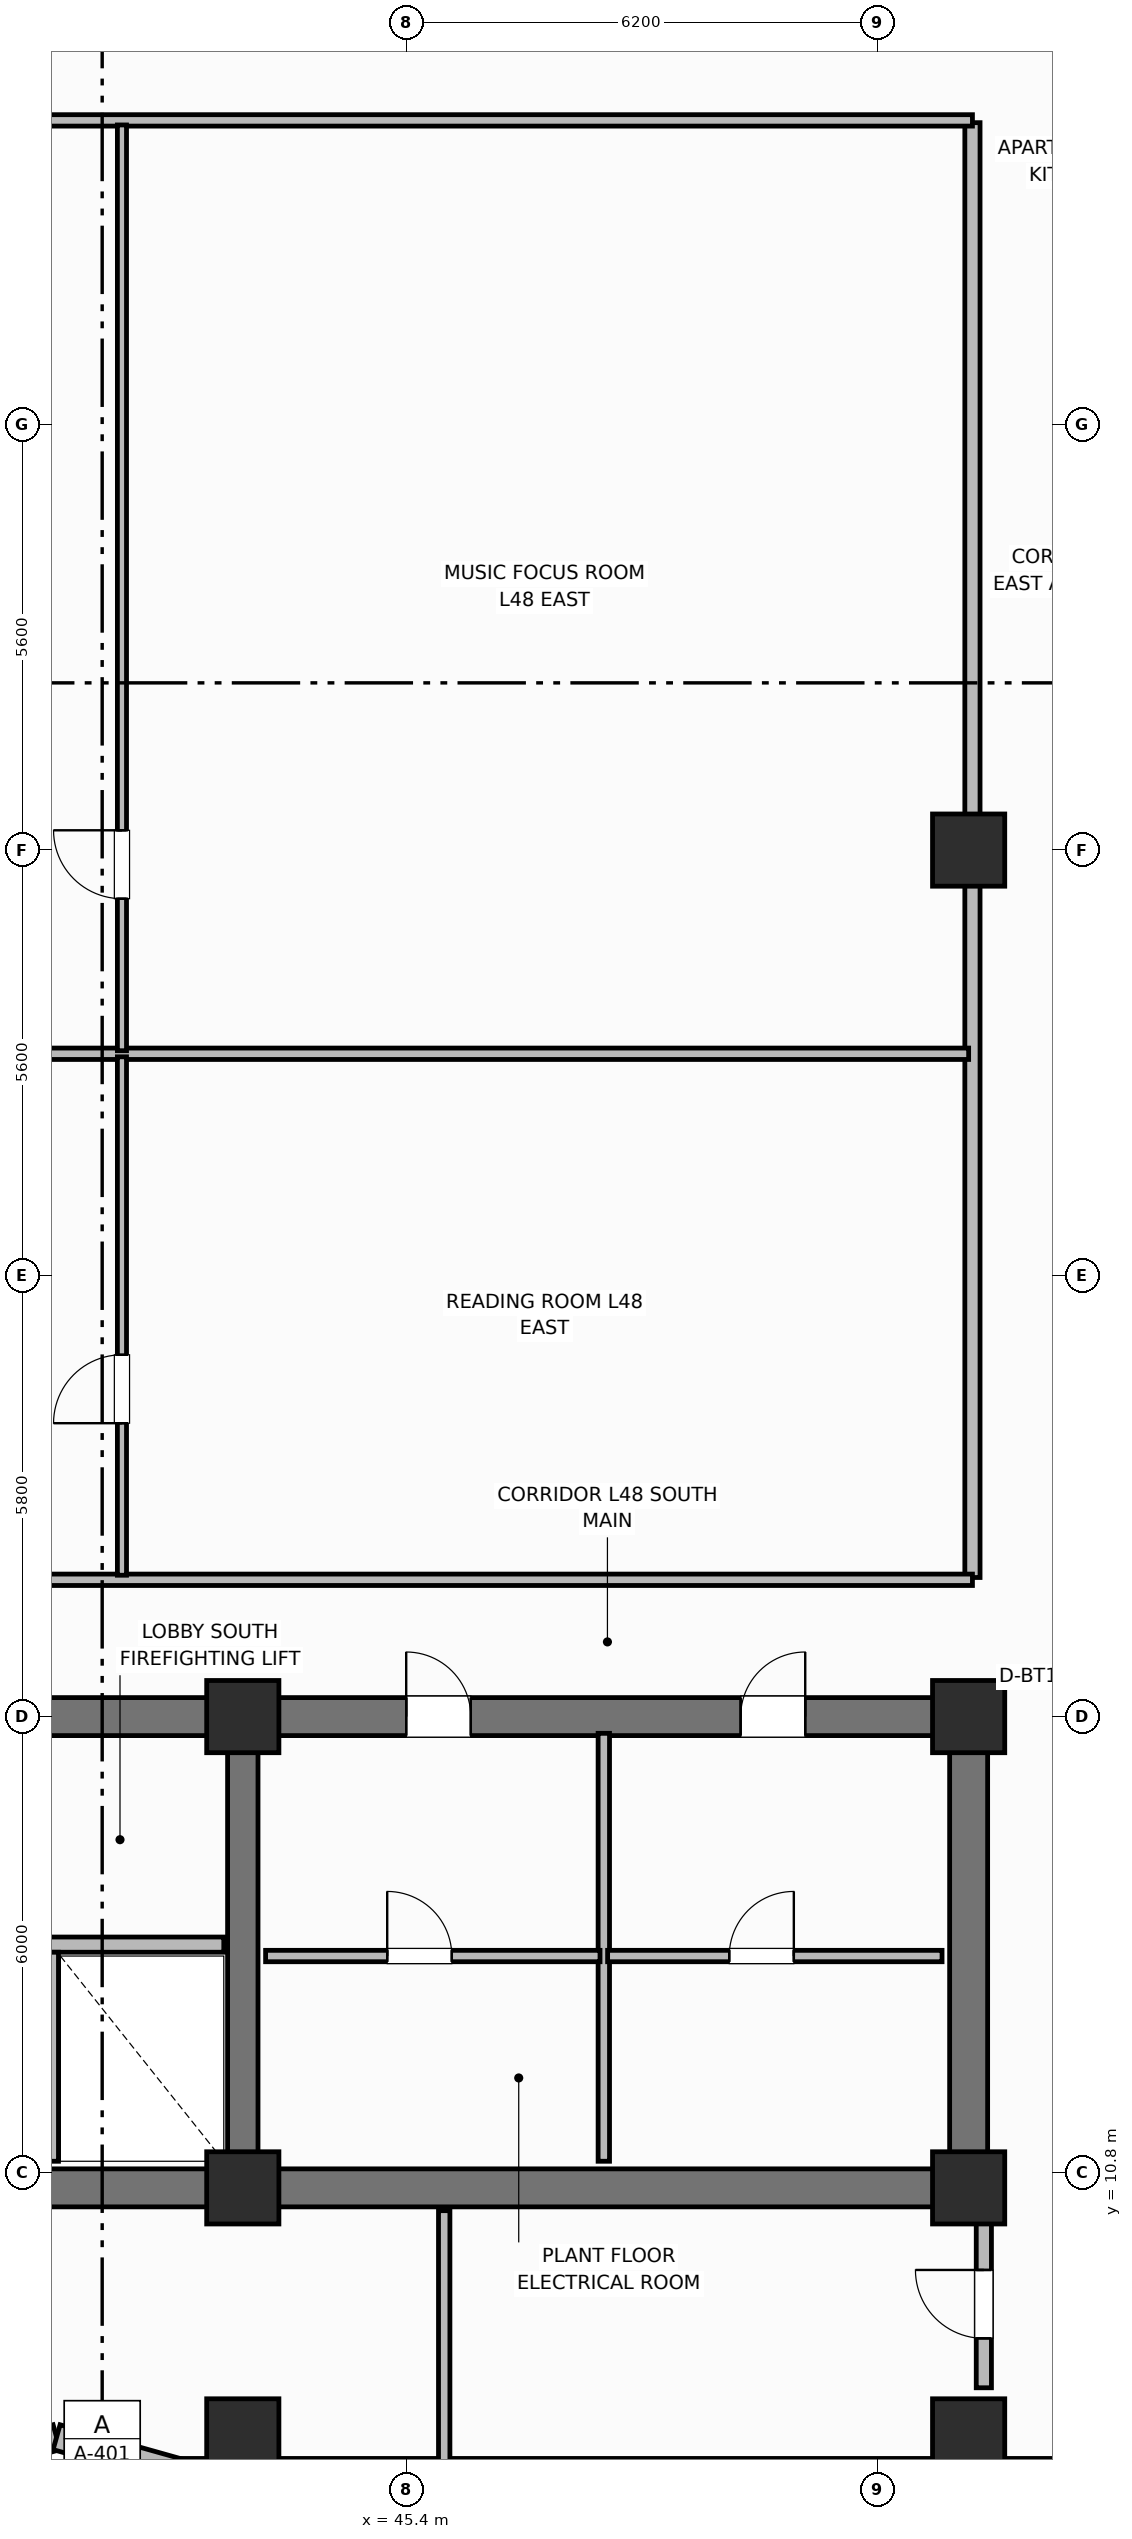
"""IFC4 building model, lengths in metres.
Left out: names, types, materials, properties, quantities, classifications, styles, units other than length and angle.
Written with IfcOpenShell. Run it as: python <this file> out.ifc"""

import sys

from ifc_helpers import new_model, si_unit, direction, frame, frame_2d, origin, origin_2d, place, context, subcontext, project, spatial, rectangle, extrude, element, fill, save


model = new_model("IFC4")
c1 = context("Model", 3, precision=1e-05, world=origin(), true_north=direction((0.0, 1.0)))
c2 = subcontext(c1, "Body", "Model", "MODEL_VIEW")
j1 = project(units=[si_unit("LENGTHUNIT", "METRE"), si_unit("PLANEANGLEUNIT", "RADIAN")], contexts=[c1])
p1 = place(None, origin())
s1 = spatial("IfcSite", under=j1, at=p1, CompositionType="ELEMENT")
p2 = place(p1, origin())
s2 = spatial("IfcBuilding", under=s1, at=p2, CompositionType="ELEMENT")
p3 = place(p2, frame((0.0, 0.0, 192.2)))
s3 = spatial("IfcBuildingStorey", under=s2, at=p3, CompositionType="ELEMENT", Elevation=192.2)
p4 = place(p3, frame((52.8, 10.6, 0.0), z_axis=(0.0, 0.0, 1.0), x_axis=(-1.0, 0.0, 0.0)))
e1 = element("IfcWall", 1, at=p4, inside=s3, PredefinedType="SHEAR", context=c2, shape_type="SweptSolid", body=[
    extrude(rectangle(XDim=27.2, YDim=0.5, at=frame_2d((13.6, 0.0))), origin(), (0.0, 0.0, 1.0), 3.7),
])
p5 = place(p3, frame((52.8, 10.85, 0.0), z_axis=(0.0, 0.0, 1.0), x_axis=(0.0, 1.0, 0.0)))
e2 = element("IfcWall", 2, at=p5, inside=s3, PredefinedType="SHEAR", context=c2, shape_type="SweptSolid", body=[
    extrude(rectangle(XDim=5.7, YDim=0.5, at=frame_2d((2.85, 0.0))), origin(), (0.0, 0.0, 1.0), 3.7),
])
p6 = place(p3, frame((25.6, 16.8, 0.0), z_axis=(0.0, 0.0, 1.0), x_axis=(1.0, 0.0, 0.0)))
e3 = element("IfcWall", 3, at=p6, inside=s3, PredefinedType="SHEAR", context=c2, shape_type="SweptSolid", body=[
    extrude(rectangle(XDim=27.2, YDim=0.5, at=frame_2d((13.6, 0.0))), origin(), (0.0, 0.0, 1.0), 3.7),
])
p7 = place(p6, frame((1.7, 0.0, 0.0)))
e4 = element("IfcOpeningElement", 4, at=p7, cuts=e3, PredefinedType="OPENING", context=c2, shape_type="SweptSolid", body=[
    extrude(rectangle(XDim=1.1, YDim=2.15, at=frame_2d((0.55, 1.075))), frame((0.0, 0.26, 0.0), z_axis=(0.0, -1.0, 0.0), x_axis=(1.0, 0.0, 0.0)), (0.0, 0.0, 1.0), 0.52),
])
p8 = place(p6, frame((4.45, 0.0, 0.0)))
e5 = element("IfcOpeningElement", 5, at=p8, cuts=e3, PredefinedType="OPENING", context=c2, shape_type="SweptSolid", body=[
    extrude(rectangle(XDim=0.85, YDim=2.1, at=frame_2d((0.425, 1.05))), frame((0.0, 0.26, 0.0), z_axis=(0.0, -1.0, 0.0), x_axis=(1.0, 0.0, 0.0)), (0.0, 0.0, 1.0), 0.52),
])
p9 = place(p6, frame((6.5, 0.0, 0.0)))
e6 = element("IfcOpeningElement", 6, at=p9, cuts=e3, PredefinedType="OPENING", context=c2, shape_type="SweptSolid", body=[
    extrude(rectangle(XDim=0.85, YDim=2.1, at=frame_2d((0.425, 1.05))), frame((0.0, 0.26, 0.0), z_axis=(0.0, -1.0, 0.0), x_axis=(1.0, 0.0, 0.0)), (0.0, 0.0, 1.0), 0.52),
])
p10 = place(p6, frame((13.0, 0.0, 0.0)))
e7 = element("IfcOpeningElement", 7, at=p10, cuts=e3, PredefinedType="OPENING", context=c2, shape_type="SweptSolid", body=[
    extrude(rectangle(XDim=1.2, YDim=2.15, at=frame_2d((0.6, 1.075))), frame((0.0, 0.26, 0.0), z_axis=(0.0, -1.0, 0.0), x_axis=(1.0, 0.0, 0.0)), (0.0, 0.0, 1.0), 0.52),
])
p11 = place(p6, frame((19.8, 0.0, 0.0)))
e8 = element("IfcOpeningElement", 8, at=p11, cuts=e3, PredefinedType="OPENING", context=c2, shape_type="SweptSolid", body=[
    extrude(rectangle(XDim=0.85, YDim=2.1, at=frame_2d((0.425, 1.05))), frame((0.0, 0.26, 0.0), z_axis=(0.0, -1.0, 0.0), x_axis=(1.0, 0.0, 0.0)), (0.0, 0.0, 1.0), 0.52),
])
p12 = place(p6, frame((24.2, 0.0, 0.0)))
e9 = element("IfcOpeningElement", 9, at=p12, cuts=e3, PredefinedType="OPENING", context=c2, shape_type="SweptSolid", body=[
    extrude(rectangle(XDim=0.85, YDim=2.1, at=frame_2d((0.425, 1.05))), frame((0.0, 0.26, 0.0), z_axis=(0.0, -1.0, 0.0), x_axis=(1.0, 0.0, 0.0)), (0.0, 0.0, 1.0), 0.52),
])
p13 = place(p3, frame((43.25, 10.85, 0.0), z_axis=(0.0, 0.0, 1.0), x_axis=(0.0, 1.0, 0.0)))
e10 = element("IfcWall", 10, at=p13, inside=s3, PredefinedType="SHEAR", context=c2, shape_type="SweptSolid", body=[
    extrude(rectangle(XDim=5.7, YDim=0.4, at=frame_2d((2.85, 0.0))), origin(), (0.0, 0.0, 1.0), 3.7),
])
for number, where, z_axis, x_axis in (
    (11, (43.25, 10.6, 0.0), (0.0, 0.0, 1.0), (1.0, 0.0, 0.0)),
    (12, (43.25, 16.8, 0.0), (0.0, 0.0, 1.0), (1.0, 0.0, 0.0)),
    (13, (52.8, 10.6, 0.0), (0.0, 0.0, 1.0), (1.0, 0.0, 0.0)),
    (14, (52.8, 16.8, 0.0), (0.0, 0.0, 1.0), (1.0, 0.0, 0.0)),
    (15, (52.8, 28.2, 0.0), (0.0, 0.0, 1.0), (1.0, 0.0, 0.0)),
    (16, (43.25, 7.35, 0.0), (0.0, 0.0, 1.0), (1.0, 0.0, 0.0)),
    (17, (52.8, 7.35, 0.0), (0.0, 0.0, 1.0), (1.0, 0.0, 0.0)),
):
    element("IfcColumn", number, at=place(p3, frame(where, z_axis=z_axis, x_axis=x_axis)), inside=s3, PredefinedType="COLUMN", context=c2, shape_type="SweptSolid", body=[
        extrude(rectangle(XDim=0.95, YDim=0.95, at=origin_2d()), origin(), (0.0, 0.0, 1.0), 3.7),
    ])
p14 = place(p3, frame((39.2, 6.87, 0.0), z_axis=(0.0, 0.0, 1.0), x_axis=(0.962662902433, 0.270703040766, 0.0)))
e18 = element("IfcWall", 18, at=p14, inside=s3, PredefinedType="SOLIDWALL", context=c2, shape_type="SweptSolid", body=[
    extrude(rectangle(XDim=1.662, YDim=0.34, at=frame_2d((0.831, 0.0))), origin(), (0.0, 0.0, 1.0), 2.66),
])
p15 = place(p3, frame((40.8, 7.32, 0.0), z_axis=(0.0, 0.0, 1.0), x_axis=(0.962652136636, -0.270741322725, 0.0)))
e19 = element("IfcWall", 19, at=p15, inside=s3, PredefinedType="SOLIDWALL", context=c2, shape_type="SweptSolid", body=[
    extrude(rectangle(XDim=1.662, YDim=0.34, at=frame_2d((0.831, 0.0))), origin(), (0.0, 0.0, 1.0), 2.66),
])
p16 = place(p3, frame((42.4, 6.87, 0.0), z_axis=(0.0, 0.0, 1.0), x_axis=(1.0, 0.0, 0.0)))
e20 = element("IfcWall", 20, at=p16, inside=s3, PredefinedType="SOLIDWALL", context=c2, shape_type="SweptSolid", body=[
    extrude(rectangle(XDim=15.8, YDim=0.34, at=frame_2d((7.9, 0.0))), origin(), (0.0, 0.0, 1.0), 2.66),
])
p17 = place(p16, frame((4.45, 0.0, 0.89)))
e21 = element("IfcOpeningElement", 21, at=p17, cuts=e20, PredefinedType="OPENING", context=c2, shape_type="SweptSolid", body=[
    extrude(rectangle(XDim=1.1, YDim=1.65, at=frame_2d((0.55, 0.825))), frame((0.0, 0.18, 0.0), z_axis=(0.0, -1.0, 0.0), x_axis=(1.0, 0.0, 0.0)), (0.0, 0.0, 1.0), 0.36),
])
p18 = place(p16, frame((7.35, 0.0, 0.89)))
e22 = element("IfcOpeningElement", 22, at=p18, cuts=e20, PredefinedType="OPENING", context=c2, shape_type="SweptSolid", body=[
    extrude(rectangle(XDim=1.1, YDim=1.65, at=frame_2d((0.55, 0.825))), frame((0.0, 0.18, 0.0), z_axis=(0.0, -1.0, 0.0), x_axis=(1.0, 0.0, 0.0)), (0.0, 0.0, 1.0), 0.36),
])
p19 = place(p16, frame((13.85, 0.0, 0.89)))
e23 = element("IfcOpeningElement", 23, at=p19, cuts=e20, PredefinedType="OPENING", context=c2, shape_type="SweptSolid", body=[
    extrude(rectangle(XDim=1.1, YDim=1.65, at=frame_2d((0.55, 0.825))), frame((0.0, 0.18, 0.0), z_axis=(0.0, -1.0, 0.0), x_axis=(1.0, 0.0, 0.0)), (0.0, 0.0, 1.0), 0.36),
])
p20 = place(p3, frame((35.4, 13.8, 0.0), z_axis=(0.0, 0.0, 1.0), x_axis=(1.0, 0.0, 0.0)))
e24 = element("IfcWall", 24, at=p20, inside=s3, PredefinedType="PARTITIONING", context=c2, shape_type="SweptSolid", body=[
    extrude(rectangle(XDim=7.6, YDim=0.2, at=frame_2d((3.8, 0.0))), origin(), (0.0, 0.0, 1.0), 2.26),
])
p21 = place(p20, frame((0.7, 0.0, 0.0)))
e25 = element("IfcOpeningElement", 25, at=p21, cuts=e24, PredefinedType="OPENING", context=c2, shape_type="SweptSolid", body=[
    extrude(rectangle(XDim=1.1, YDim=2.15, at=frame_2d((0.55, 1.075))), frame((0.0, 0.11, 0.0), z_axis=(0.0, -1.0, 0.0), x_axis=(1.0, 0.0, 0.0)), (0.0, 0.0, 1.0), 0.22),
])
p22 = place(p20, frame((3.35, 0.0, 0.0)))
e26 = element("IfcOpeningElement", 26, at=p22, cuts=e24, PredefinedType="OPENING", context=c2, shape_type="SweptSolid", body=[
    extrude(rectangle(XDim=1.2, YDim=2.15, at=frame_2d((0.6, 1.075))), frame((0.0, 0.11, 0.0), z_axis=(0.0, -1.0, 0.0), x_axis=(1.0, 0.0, 0.0)), (0.0, 0.0, 1.0), 0.22),
])
p23 = place(p3, frame((40.75, 10.95, 0.0), z_axis=(0.0, 0.0, 1.0), x_axis=(0.0, 1.0, 0.0)))
e27 = element("IfcWall", 27, at=p23, inside=s3, PredefinedType="PARTITIONING", context=c2, shape_type="SweptSolid", body=[
    extrude(rectangle(XDim=2.75, YDim=0.15, at=frame_2d((1.375, 0.0))), origin(), (0.0, 0.0, 1.0), 2.49),
])
p24 = place(p3, frame((48.0, 10.95, 0.0), z_axis=(0.0, 0.0, 1.0), x_axis=(0.0, 1.0, 0.0)))
e28 = element("IfcWall", 28, at=p24, inside=s3, PredefinedType="PARTITIONING", context=c2, shape_type="SweptSolid", body=[
    extrude(rectangle(XDim=5.63, YDim=0.15, at=frame_2d((2.815, 0.0))), origin(), (0.0, 0.0, 1.0), 2.49),
])
p25 = place(p3, frame((43.55, 13.65, 0.0), z_axis=(0.0, 0.0, 1.0), x_axis=(1.0, 0.0, 0.0)))
e29 = element("IfcWall", 29, at=p25, inside=s3, PredefinedType="PARTITIONING", context=c2, shape_type="SweptSolid", body=[
    extrude(rectangle(XDim=4.4, YDim=0.15, at=frame_2d((2.2, 0.0))), origin(), (0.0, 0.0, 1.0), 2.49),
])
p26 = place(p25, frame((1.6, 0.0, 0.0)))
e30 = element("IfcOpeningElement", 30, at=p26, cuts=e29, PredefinedType="OPENING", context=c2, shape_type="SweptSolid", body=[
    extrude(rectangle(XDim=0.85, YDim=2.1, at=frame_2d((0.425, 1.05))), frame((0.0, 0.085, 0.0), z_axis=(0.0, -1.0, 0.0), x_axis=(1.0, 0.0, 0.0)), (0.0, 0.0, 1.0), 0.17),
])
p27 = place(p3, frame((48.05, 13.65, 0.0), z_axis=(0.0, 0.0, 1.0), x_axis=(1.0, 0.0, 0.0)))
e31 = element("IfcWall", 31, at=p27, inside=s3, PredefinedType="PARTITIONING", context=c2, shape_type="SweptSolid", body=[
    extrude(rectangle(XDim=4.4, YDim=0.15, at=frame_2d((2.2, 0.0))), origin(), (0.0, 0.0, 1.0), 2.49),
])
p28 = place(p27, frame((1.6, 0.0, 0.0)))
e32 = element("IfcOpeningElement", 32, at=p28, cuts=e31, PredefinedType="OPENING", context=c2, shape_type="SweptSolid", body=[
    extrude(rectangle(XDim=0.85, YDim=2.1, at=frame_2d((0.425, 1.05))), frame((0.0, 0.085, 0.0), z_axis=(0.0, -1.0, 0.0), x_axis=(1.0, 0.0, 0.0)), (0.0, 0.0, 1.0), 0.17),
])
p29 = place(p3, frame((52.85, 18.63, 0.0), z_axis=(0.0, 0.0, 1.0), x_axis=(0.0, 1.0, 0.0)))
e33 = element("IfcWall", 33, at=p29, inside=s3, PredefinedType="PARTITIONING", context=c2, shape_type="SweptSolid", body=[
    extrude(rectangle(XDim=19.14, YDim=0.2, at=frame_2d((9.57, 0.0))), origin(), (0.0, 0.0, 1.0), 2.49),
])
for number, where, z_axis, x_axis in (
    (34, (30.55, 18.6, 0.0), (0.0, 0.0, 1.0), (1.0, 0.0, 0.0)),
    (35, (30.55, 37.8, 0.0), (0.0, 0.0, 1.0), (1.0, 0.0, 0.0)),
):
    element("IfcWall", number, at=place(p3, frame(where, z_axis=z_axis, x_axis=x_axis)), inside=s3, PredefinedType="PARTITIONING", context=c2, shape_type="SweptSolid", body=[
        extrude(rectangle(XDim=22.3, YDim=0.15, at=frame_2d((11.15, 0.0))), origin(), (0.0, 0.0, 1.0), 2.49),
    ])
p30 = place(p3, frame((30.58, 25.521, 0.0), z_axis=(0.0, 0.0, 1.0), x_axis=(1.0, 0.0, 0.0)))
e36 = element("IfcWall", 36, at=p30, inside=s3, PredefinedType="PARTITIONING", context=c2, shape_type="SweptSolid", body=[
    extrude(rectangle(XDim=22.22, YDim=0.15, at=frame_2d((11.11, 0.0))), origin(), (0.0, 0.0, 1.0), 2.49),
])
p31 = place(p3, frame((41.66, 18.66, 0.0), z_axis=(0.0, 0.0, 1.0), x_axis=(0.0, 1.0, 0.0)))
e37 = element("IfcWall", 37, at=p31, inside=s3, PredefinedType="PARTITIONING", context=c2, shape_type="SweptSolid", body=[
    extrude(rectangle(XDim=6.821, YDim=0.12, at=frame_2d((3.41, 0.0))), origin(), (0.0, 0.0, 1.0), 2.49),
])
p32 = place(p31, frame((2.0, 0.0, 0.0)))
e38 = element("IfcOpeningElement", 38, at=p32, cuts=e37, PredefinedType="OPENING", context=c2, shape_type="SweptSolid", body=[
    extrude(rectangle(XDim=0.9, YDim=2.1, at=frame_2d((0.45, 1.05))), frame((0.0, 0.07, 0.0), z_axis=(0.0, -1.0, 0.0), x_axis=(1.0, 0.0, 0.0)), (0.0, 0.0, 1.0), 0.14),
])
p33 = place(p3, frame((41.66, 25.56, 0.0), z_axis=(0.0, 0.0, 1.0), x_axis=(0.0, 1.0, 0.0)))
e39 = element("IfcWall", 39, at=p33, inside=s3, PredefinedType="PARTITIONING", context=c2, shape_type="SweptSolid", body=[
    extrude(rectangle(XDim=12.18, YDim=0.12, at=frame_2d((6.09, 0.0))), origin(), (0.0, 0.0, 1.0), 2.49),
])
p34 = place(p33, frame((2.0, 0.0, 0.0)))
e40 = element("IfcOpeningElement", 40, at=p34, cuts=e39, PredefinedType="OPENING", context=c2, shape_type="SweptSolid", body=[
    extrude(rectangle(XDim=0.9, YDim=2.1, at=frame_2d((0.45, 1.05))), frame((0.0, 0.07, 0.0), z_axis=(0.0, -1.0, 0.0), x_axis=(1.0, 0.0, 0.0)), (0.0, 0.0, 1.0), 0.14),
])
p35 = place(p3, frame((45.9, 6.87, 0.0), z_axis=(0.0, 0.0, 1.0), x_axis=(0.0, 1.0, 0.0)))
e41 = element("IfcWall", 41, at=p35, inside=s3, PredefinedType="PARTITIONING", context=c2, shape_type="SweptSolid", body=[
    extrude(rectangle(XDim=3.43, YDim=0.15, at=frame_2d((1.715, 0.0))), origin(), (0.0, 0.0, 1.0), 2.49),
])
p36 = place(p3, frame((53.0, 7.97, 0.0), z_axis=(0.0, 0.0, 1.0), x_axis=(0.0, 1.0, 0.0)))
e42 = element("IfcWall", 42, at=p36, inside=s3, PredefinedType="PARTITIONING", context=c2, shape_type="SweptSolid", body=[
    extrude(rectangle(XDim=2.33, YDim=0.2, at=frame_2d((1.165, 0.0))), origin(), (0.0, 0.0, 1.0), 2.49),
])
p37 = place(p36, frame((0.65, 0.0, 0.0)))
e43 = element("IfcOpeningElement", 43, at=p37, cuts=e42, PredefinedType="OPENING", context=c2, shape_type="SweptSolid", body=[
    extrude(rectangle(XDim=0.9, YDim=2.1, at=frame_2d((0.45, 1.05))), frame((0.0, 0.11, 0.0), z_axis=(0.0, -1.0, 0.0), x_axis=(1.0, 0.0, 0.0)), (0.0, 0.0, 1.0), 0.22),
])
p38 = place(p26, origin())
e44 = element("IfcDoor", 44, at=p38, inside=s3, OperationType="SINGLE_SWING_LEFT", PredefinedType="DOOR", context=c2, shape_type="SweptSolid", body=[
    extrude(rectangle(XDim=0.85, YDim=2.1, at=frame_2d((0.425, 1.05))), frame((0.0, 0.025, 0.0), z_axis=(0.0, -1.0, 0.0), x_axis=(1.0, 0.0, 0.0)), (0.0, 0.0, 1.0), 0.05),
])
fill(e30, e44)
p39 = place(p28, origin())
e45 = element("IfcDoor", 45, at=p39, inside=s3, OperationType="SINGLE_SWING_RIGHT", PredefinedType="DOOR", context=c2, shape_type="SweptSolid", body=[
    extrude(rectangle(XDim=0.85, YDim=2.1, at=frame_2d((0.425, 1.05))), frame((0.0, 0.025, 0.0), z_axis=(0.0, -1.0, 0.0), x_axis=(1.0, 0.0, 0.0)), (0.0, 0.0, 1.0), 0.05),
])
fill(e32, e45)
p40 = place(p32, origin())
e46 = element("IfcDoor", 46, at=p40, inside=s3, OperationType="SINGLE_SWING_LEFT", PredefinedType="DOOR", context=c2, shape_type="SweptSolid", body=[
    extrude(rectangle(XDim=0.9, YDim=2.1, at=frame_2d((0.45, 1.05))), frame((0.0, 0.025, 0.0), z_axis=(0.0, -1.0, 0.0), x_axis=(1.0, 0.0, 0.0)), (0.0, 0.0, 1.0), 0.05),
])
fill(e38, e46)
p41 = place(p34, origin())
e47 = element("IfcDoor", 47, at=p41, inside=s3, OperationType="SINGLE_SWING_RIGHT", PredefinedType="DOOR", context=c2, shape_type="SweptSolid", body=[
    extrude(rectangle(XDim=0.9, YDim=2.1, at=frame_2d((0.45, 1.05))), frame((0.0, 0.025, 0.0), z_axis=(0.0, -1.0, 0.0), x_axis=(1.0, 0.0, 0.0)), (0.0, 0.0, 1.0), 0.05),
])
fill(e40, e47)
p42 = place(p37, origin())
e48 = element("IfcDoor", 48, at=p42, inside=s3, OperationType="SINGLE_SWING_RIGHT", PredefinedType="DOOR", context=c2, shape_type="SweptSolid", body=[
    extrude(rectangle(XDim=0.9, YDim=2.1, at=frame_2d((0.45, 1.05))), frame((0.0, 0.025, 0.0), z_axis=(0.0, -1.0, 0.0), x_axis=(1.0, 0.0, 0.0)), (0.0, 0.0, 1.0), 0.05),
])
fill(e43, e48)
p43 = place(p11, origin())
e49 = element("IfcDoor", 49, at=p43, inside=s3, OperationType="SINGLE_SWING_LEFT", PredefinedType="DOOR", context=c2, shape_type="SweptSolid", body=[
    extrude(rectangle(XDim=0.85, YDim=2.1, at=frame_2d((0.425, 1.05))), frame((0.0, 0.025, 0.0), z_axis=(0.0, -1.0, 0.0), x_axis=(1.0, 0.0, 0.0)), (0.0, 0.0, 1.0), 0.05),
])
fill(e8, e49)
p44 = place(p12, origin())
e50 = element("IfcDoor", 50, at=p44, inside=s3, OperationType="SINGLE_SWING_RIGHT", PredefinedType="DOOR", context=c2, shape_type="SweptSolid", body=[
    extrude(rectangle(XDim=0.85, YDim=2.1, at=frame_2d((0.425, 1.05))), frame((0.0, 0.025, 0.0), z_axis=(0.0, -1.0, 0.0), x_axis=(1.0, 0.0, 0.0)), (0.0, 0.0, 1.0), 0.05),
])
fill(e9, e50)
save(model, sys.argv[1])
